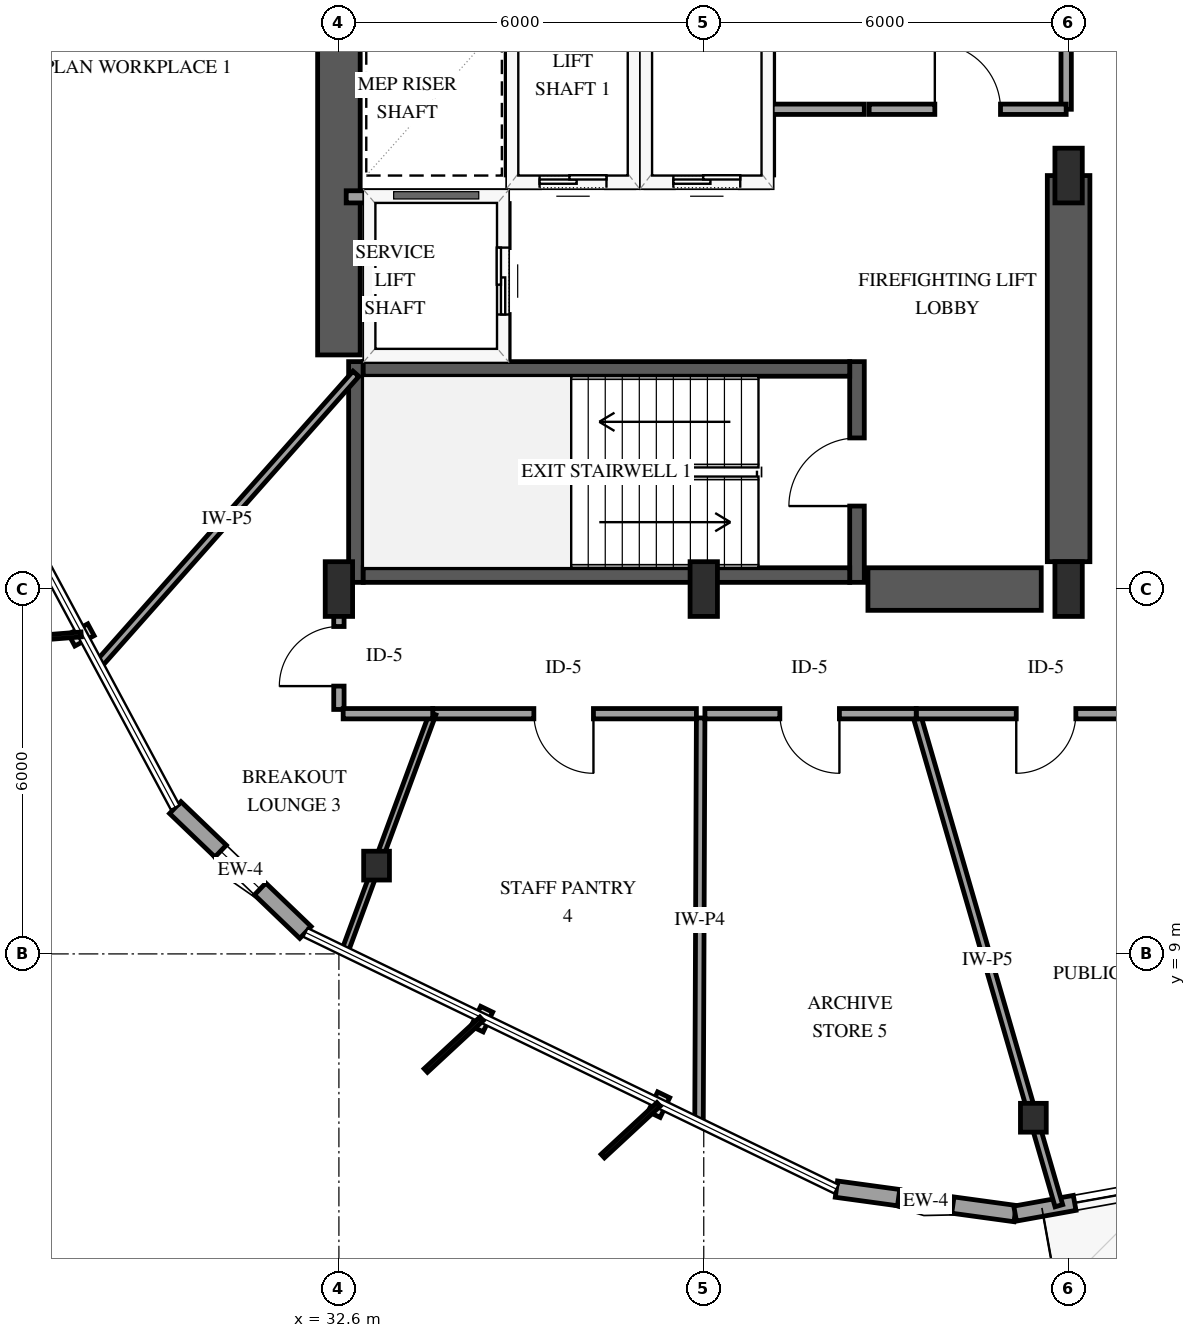
"""IFC4 building model, lengths in metres.
Left out: names, types, materials, properties, quantities, classifications, styles, units other than length and angle.
Written with IfcOpenShell. Run it as: python <this file> out.ifc"""

import sys

from ifc_helpers import new_model, si_unit, direction, frame, frame_2d, origin, origin_2d, place, context, subcontext, project, spatial, rectangle, i_section, extrude, element, fill, save


model = new_model("IFC4")
c1 = context("Model", 3, precision=1e-05, world=origin(), true_north=direction((0.0, 1.0)))
c2 = subcontext(c1, "Body", "Model", "MODEL_VIEW")
j1 = project(units=[si_unit("LENGTHUNIT", "METRE"), si_unit("PLANEANGLEUNIT", "RADIAN")], contexts=[c1])
p1 = place(None, origin())
s1 = spatial("IfcSite", under=j1, at=p1, CompositionType="ELEMENT")
p2 = place(p1, origin())
s2 = spatial("IfcBuilding", under=s1, at=p2, CompositionType="ELEMENT")
p3 = place(p2, frame((0.0, 0.0, 66.6)))
s3 = spatial("IfcBuildingStorey", under=s2, at=p3, CompositionType="ELEMENT", Elevation=66.6)
p4 = place(p3, frame((32.88, 15.11, 0.0), z_axis=(0.0, 0.0, 1.0), x_axis=(0.0, 1.0, 0.0)))
e1 = element("IfcWall", 1, at=p4, inside=s3, PredefinedType="SHEAR", context=c2, shape_type="SweptSolid", body=[
    extrude(rectangle(XDim=3.63, YDim=0.24, at=frame_2d((1.815, 0.0))), origin(), (0.0, 0.0, 1.0), 4.0),
])
p5 = place(p3, frame((41.12, 15.11, 0.0), z_axis=(0.0, 0.0, 1.0), x_axis=(0.0, 1.0, 0.0)))
e2 = element("IfcWall", 2, at=p5, inside=s3, PredefinedType="SHEAR", context=c2, shape_type="SweptSolid", body=[
    extrude(rectangle(XDim=3.63, YDim=0.24, at=frame_2d((1.815, 0.0))), origin(), (0.0, 0.0, 1.0), 4.0),
])
p6 = place(p5, frame((1.255, 0.0, 0.0)))
e3 = element("IfcOpeningElement", 3, at=p6, cuts=e2, PredefinedType="OPENING", context=c2, shape_type="SweptSolid", body=[
    extrude(rectangle(XDim=1.12, YDim=2.15, at=frame_2d((0.56, 1.075))), frame((0.0, 0.13, 0.0), z_axis=(0.0, -1.0, 0.0), x_axis=(1.0, 0.0, 0.0)), (0.0, 0.0, 1.0), 0.26),
])
for number, where, z_axis, x_axis in (
    (4, (33.0, 15.23, 0.0), (0.0, 0.0, 1.0), (1.0, 0.0, 0.0)),
    (5, (33.0, 18.62, 0.0), (0.0, 0.0, 1.0), (1.0, 0.0, 0.0)),
):
    element("IfcWall", number, at=place(p3, frame(where, z_axis=z_axis, x_axis=x_axis)), inside=s3, PredefinedType="SHEAR", context=c2, shape_type="SweptSolid", body=[
        extrude(rectangle(XDim=8.0, YDim=0.24, at=frame_2d((4.0, 0.0))), origin(), (0.0, 0.0, 1.0), 4.0),
    ])
p7 = place(p3, frame((32.6, 18.85, 0.0), z_axis=(0.0, 0.0, 1.0), x_axis=(0.0, 1.0, 0.0)))
e6 = element("IfcWall", 6, at=p7, inside=s3, PredefinedType="SHEAR", context=c2, shape_type="SweptSolid", body=[
    extrude(rectangle(XDim=12.3, YDim=0.7, at=frame_2d((6.15, 0.0))), origin(), (0.0, 0.0, 1.0), 4.0),
])
p8 = place(p3, frame((41.3, 15.0, 0.0), z_axis=(0.0, 0.0, 1.0), x_axis=(1.0, 0.0, 0.0)))
e7 = element("IfcWall", 7, at=p8, inside=s3, PredefinedType="SHEAR", context=c2, shape_type="SweptSolid", body=[
    extrude(rectangle(XDim=2.85, YDim=0.7, at=frame_2d((1.425, 0.0))), origin(), (0.0, 0.0, 1.0), 4.0),
])
p9 = place(p3, frame((44.6, 15.45, 0.0), z_axis=(0.0, 0.0, 1.0), x_axis=(0.0, 1.0, 0.0)))
e8 = element("IfcWall", 8, at=p9, inside=s3, PredefinedType="SHEAR", context=c2, shape_type="SweptSolid", body=[
    extrude(rectangle(XDim=6.35, YDim=0.7, at=frame_2d((3.175, 0.0))), origin(), (0.0, 0.0, 1.0), 4.0),
])
for number, where, z_axis, x_axis in (
    (9, (32.6, 15.0, 0.0), (0.0, 0.0, 1.0), (1.0, 0.0, 0.0)),
    (10, (38.6, 15.0, 0.0), (0.0, 0.0, 1.0), (1.0, 0.0, 0.0)),
    (11, (44.6, 15.0, 0.0), (0.0, 0.0, 1.0), (1.0, 0.0, 0.0)),
    (12, (44.6, 21.8, 0.0), (0.0, 0.0, 1.0), (1.0, 0.0, 0.0)),
):
    element("IfcColumn", number, at=place(p3, frame(where, z_axis=z_axis, x_axis=x_axis)), inside=s3, PredefinedType="PILASTER", context=c2, shape_type="SweptSolid", body=[
        extrude(rectangle(XDim=0.45, YDim=0.9, at=origin_2d()), origin(), (0.0, 0.0, 1.0), 4.0),
    ])
for number, where, z_axis, x_axis in (
    (13, (33.219, 10.452, 0.0), (0.0, 0.0, 1.0), (1.0, 0.0, 0.0)),
    (14, (44.02, 6.306, 0.0), (0.0, 0.0, 1.0), (1.0, 0.0, 0.0)),
):
    element("IfcColumn", number, at=place(p3, frame(where, z_axis=z_axis, x_axis=x_axis)), inside=s3, PredefinedType="COLUMN", context=c2, shape_type="SweptSolid", body=[
        extrude(i_section(OverallWidth=0.424, OverallDepth=0.474, WebThickness=0.048, FlangeThickness=0.077, FilletRadius=0.038, at=origin_2d()), origin(), (0.0, 0.0, 1.0), 4.0),
    ])
p10 = place(p3, frame((29.909, 11.406, 0.0), z_axis=(0.0, 0.0, 1.0), x_axis=(0.721765475307, -0.69213770209, 0.0)))
e15 = element("IfcWall", 15, at=p10, inside=s3, PredefinedType="SOLIDWALL", context=c2, shape_type="SweptSolid", body=[
    extrude(rectangle(XDim=2.967, YDim=0.27, at=frame_2d((1.483, 0.0))), origin(), (0.0, 0.0, 1.0), 3.079),
])
p11 = place(p10, frame((1.033, 0.0, 0.75)))
e16 = element("IfcOpeningElement", 16, at=p11, cuts=e15, PredefinedType="OPENING", context=c2, shape_type="SweptSolid", body=[
    extrude(rectangle(XDim=0.9, YDim=1.5, at=frame_2d((0.45, 0.75))), frame((0.0, 0.145, 0.0), z_axis=(0.0, -1.0, 0.0), x_axis=(1.0, 0.0, 0.0)), (0.0, 0.0, 1.0), 0.29),
])
p12 = place(p3, frame((40.781, 5.132, 0.0), z_axis=(0.0, 0.0, 1.0), x_axis=(0.990749365916, -0.13570443595, 0.0)))
e17 = element("IfcWall", 17, at=p12, inside=s3, PredefinedType="SOLIDWALL", context=c2, shape_type="SweptSolid", body=[
    extrude(rectangle(XDim=2.967, YDim=0.27, at=frame_2d((1.483, 0.0))), origin(), (0.0, 0.0, 1.0), 3.079),
])
p13 = place(p12, frame((1.033, 0.0, 0.75)))
e18 = element("IfcOpeningElement", 18, at=p13, cuts=e17, PredefinedType="OPENING", context=c2, shape_type="SweptSolid", body=[
    extrude(rectangle(XDim=0.9, YDim=1.5, at=frame_2d((0.45, 0.75))), frame((0.0, 0.145, 0.0), z_axis=(0.0, -1.0, 0.0), x_axis=(1.0, 0.0, 0.0)), (0.0, 0.0, 1.0), 0.29),
])
p14 = place(p3, frame((43.72, 4.729, 0.0), z_axis=(0.0, 0.0, 1.0), x_axis=(0.984196927588, 0.177077406028, 0.0)))
e19 = element("IfcWall", 19, at=p14, inside=s3, PredefinedType="SOLIDWALL", context=c2, shape_type="SweptSolid", body=[
    extrude(rectangle(XDim=9.698, YDim=0.25, at=frame_2d((4.849, 0.0))), origin(), (0.0, 0.0, 1.0), 3.079),
])
p15 = place(p14, frame((4.349, 0.0, 0.0)))
e20 = element("IfcOpeningElement", 20, at=p15, cuts=e19, PredefinedType="OPENING", context=c2, shape_type="SweptSolid", body=[
    extrude(rectangle(XDim=1.05, YDim=2.15, at=frame_2d((0.525, 1.075))), frame((0.0, 0.135, 0.0), z_axis=(0.0, -1.0, 0.0), x_axis=(1.0, 0.0, 0.0)), (0.0, 0.0, 1.0), 0.27),
])
p16 = place(p14, frame((0.995, 0.0, 0.72)))
e21 = element("IfcOpeningElement", 21, at=p16, cuts=e19, PredefinedType="OPENING", context=c2, shape_type="SweptSolid", body=[
    extrude(rectangle(XDim=1.05, YDim=1.55, at=frame_2d((0.525, 0.775))), frame((0.0, 0.135, 0.0), z_axis=(0.0, -1.0, 0.0), x_axis=(1.0, 0.0, 0.0)), (0.0, 0.0, 1.0), 0.27),
])
p17 = place(p14, frame((7.666, 0.0, 0.72)))
e22 = element("IfcOpeningElement", 22, at=p17, cuts=e19, PredefinedType="OPENING", context=c2, shape_type="SweptSolid", body=[
    extrude(rectangle(XDim=1.05, YDim=1.55, at=frame_2d((0.525, 0.775))), frame((0.0, 0.135, 0.0), z_axis=(0.0, -1.0, 0.0), x_axis=(1.0, 0.0, 0.0)), (0.0, 0.0, 1.0), 0.27),
])
p18 = place(p3, frame((35.45, 21.7, 0.0), z_axis=(0.0, 0.0, 1.0), x_axis=(1.0, 0.0, 0.0)))
e23 = element("IfcWall", 23, at=p18, inside=s3, PredefinedType="SOLIDWALL", context=c2, shape_type="SweptSolid", body=[
    extrude(rectangle(XDim=2.0, YDim=0.2, at=frame_2d((1.0, 0.0))), origin(), (0.0, 0.0, 1.0), 3.7),
])
p19 = place(p18, frame((0.45, 0.0, 0.0)))
e24 = element("IfcOpeningElement", 24, at=p19, cuts=e23, PredefinedType="OPENING", context=c2, shape_type="SweptSolid", body=[
    extrude(rectangle(XDim=1.1, YDim=2.15, at=frame_2d((0.55, 1.075))), frame((0.0, 0.11, 0.0), z_axis=(0.0, -1.0, 0.0), x_axis=(1.0, 0.0, 0.0)), (0.0, 0.0, 1.0), 0.22),
])
for number, where, z_axis, x_axis in (
    (25, (35.45, 21.81, 0.0), (0.0, 0.0, 1.0), (0.0, 1.0, 0.0)),
    (26, (37.45, 21.81, 0.0), (0.0, 0.0, 1.0), (0.0, 1.0, 0.0)),
):
    element("IfcWall", number, at=place(p3, frame(where, z_axis=z_axis, x_axis=x_axis)), inside=s3, PredefinedType="SOLIDWALL", context=c2, shape_type="SweptSolid", body=[
        extrude(rectangle(XDim=2.38, YDim=0.2, at=frame_2d((1.19, 0.0))), origin(), (0.0, 0.0, 1.0), 3.7),
    ])
p20 = place(p3, frame((37.65, 21.7, 0.0), z_axis=(0.0, 0.0, 1.0), x_axis=(1.0, 0.0, 0.0)))
e27 = element("IfcWall", 27, at=p20, inside=s3, PredefinedType="SOLIDWALL", context=c2, shape_type="SweptSolid", body=[
    extrude(rectangle(XDim=2.0, YDim=0.2, at=frame_2d((1.0, 0.0))), origin(), (0.0, 0.0, 1.0), 3.7),
])
p21 = place(p20, frame((0.45, 0.0, 0.0)))
e28 = element("IfcOpeningElement", 28, at=p21, cuts=e27, PredefinedType="OPENING", context=c2, shape_type="SweptSolid", body=[
    extrude(rectangle(XDim=1.1, YDim=2.15, at=frame_2d((0.55, 1.075))), frame((0.0, 0.11, 0.0), z_axis=(0.0, -1.0, 0.0), x_axis=(1.0, 0.0, 0.0)), (0.0, 0.0, 1.0), 0.22),
])
p22 = place(p3, frame((39.65, 21.81, 0.0), z_axis=(0.0, 0.0, 1.0), x_axis=(0.0, 1.0, 0.0)))
e29 = element("IfcWall", 29, at=p22, inside=s3, PredefinedType="SOLIDWALL", context=c2, shape_type="SweptSolid", body=[
    extrude(rectangle(XDim=2.38, YDim=0.2, at=frame_2d((1.19, 0.0))), origin(), (0.0, 0.0, 1.0), 3.7),
])
p23 = place(p3, frame((32.72, 21.45, 0.0), z_axis=(0.0, 0.0, 1.0), x_axis=(1.0, 0.0, 0.0)))
e30 = element("IfcWall", 30, at=p23, inside=s3, PredefinedType="SOLIDWALL", context=c2, shape_type="SweptSolid", body=[
    extrude(rectangle(XDim=2.58, YDim=0.2, at=frame_2d((1.29, 0.0))), origin(), (0.0, 0.0, 1.0), 3.7),
])
p24 = place(p3, frame((35.3, 18.79, 0.0), z_axis=(0.0, 0.0, 1.0), x_axis=(0.0, 1.0, 0.0)))
e31 = element("IfcWall", 31, at=p24, inside=s3, PredefinedType="SOLIDWALL", context=c2, shape_type="SweptSolid", body=[
    extrude(rectangle(XDim=2.55, YDim=0.2, at=frame_2d((1.275, 0.0))), origin(), (0.0, 0.0, 1.0), 3.7),
])
p25 = place(p24, frame((0.725, 0.0, 0.0)))
e32 = element("IfcOpeningElement", 32, at=p25, cuts=e31, PredefinedType="OPENING", context=c2, shape_type="SweptSolid", body=[
    extrude(rectangle(XDim=1.1, YDim=2.15, at=frame_2d((0.55, 1.075))), frame((0.0, 0.11, 0.0), z_axis=(0.0, -1.0, 0.0), x_axis=(1.0, 0.0, 0.0)), (0.0, 0.0, 1.0), 0.22),
])
p26 = place(p3, frame((42.094, 12.95, 0.0), z_axis=(0.0, 0.0, 1.0), x_axis=(0.278473925735, -0.960443789446, 0.0)))
e33 = element("IfcWall", 33, at=p26, inside=s3, PredefinedType="PARTITIONING", context=c2, shape_type="SweptSolid", body=[
    extrude(rectangle(XDim=8.424, YDim=0.13, at=frame_2d((4.212, 0.0))), origin(), (0.0, 0.0, 1.0), 2.995),
])
p27 = place(p3, frame((44.56, 29.8, 0.0), z_axis=(0.0, 0.0, 1.0), x_axis=(0.0, -1.0, 0.0)))
e34 = element("IfcWall", 34, at=p27, inside=s3, PredefinedType="PARTITIONING", context=c2, shape_type="SweptSolid", body=[
    extrude(rectangle(XDim=6.91, YDim=0.17, at=frame_2d((3.455, 0.0))), origin(), (0.0, 0.0, 1.0), 2.74),
])
p28 = place(p27, frame((2.915, 0.0, 0.0)))
e35 = element("IfcOpeningElement", 35, at=p28, cuts=e34, PredefinedType="OPENING", context=c2, shape_type="SweptSolid", body=[
    extrude(rectangle(XDim=1.08, YDim=2.15, at=frame_2d((0.54, 1.075))), frame((0.0, 0.095, 0.0), z_axis=(0.0, -1.0, 0.0), x_axis=(1.0, 0.0, 0.0)), (0.0, 0.0, 1.0), 0.19),
])
p29 = place(p3, frame((38.549, 12.88, 0.0), z_axis=(0.0, 0.0, 1.0), x_axis=(-0.004071567748, -0.999991711134, 0.0)))
e36 = element("IfcWall", 36, at=p29, inside=s3, PredefinedType="PARTITIONING", context=c2, shape_type="SweptSolid", body=[
    extrude(rectangle(XDim=6.656, YDim=0.14, at=frame_2d((3.328, 0.0))), origin(), (0.0, 0.0, 1.0), 3.7),
])
p30 = place(p3, frame((32.88, 18.54, 0.0), z_axis=(0.0, 0.0, 1.0), x_axis=(-0.66312401375, -0.748509547293, 0.0)))
e37 = element("IfcWall", 37, at=p30, inside=s3, PredefinedType="PARTITIONING", context=c2, shape_type="SweptSolid", body=[
    extrude(rectangle(XDim=6.385, YDim=0.13, at=frame_2d((3.192, 0.0))), origin(), (0.0, 0.0, 1.0), 3.7),
])
p31 = place(p3, frame((38.479, 12.95, 0.0), z_axis=(0.0, 0.0, 1.0), x_axis=(-1.0, 0.0, 0.0)))
e38 = element("IfcWall", 38, at=p31, inside=s3, PredefinedType="PARTITIONING", context=c2, shape_type="SweptSolid", body=[
    extrude(rectangle(XDim=4.336, YDim=0.17, at=frame_2d((2.168, 0.0))), origin(), (0.0, 0.0, 1.0), 3.7),
])
p32 = place(p31, frame((1.693, 0.0, 0.0)))
e39 = element("IfcOpeningElement", 39, at=p32, cuts=e38, PredefinedType="OPENING", context=c2, shape_type="SweptSolid", body=[
    extrude(rectangle(XDim=0.98, YDim=2.15, at=frame_2d((0.49, 1.075))), frame((0.0, 0.095, 0.0), z_axis=(0.0, -1.0, 0.0), x_axis=(1.0, 0.0, 0.0)), (0.0, 0.0, 1.0), 0.19),
])
p33 = place(p3, frame((46.395, 12.95, 0.0), z_axis=(0.0, 0.0, 1.0), x_axis=(-1.0, 0.0, 0.0)))
e40 = element("IfcWall", 40, at=p33, inside=s3, PredefinedType="PARTITIONING", context=c2, shape_type="SweptSolid", body=[
    extrude(rectangle(XDim=4.301, YDim=0.17, at=frame_2d((2.15, 0.0))), origin(), (0.0, 0.0, 1.0), 3.7),
])
p34 = place(p33, frame((1.676, 0.0, 0.0)))
e41 = element("IfcOpeningElement", 41, at=p34, cuts=e40, PredefinedType="OPENING", context=c2, shape_type="SweptSolid", body=[
    extrude(rectangle(XDim=0.98, YDim=2.15, at=frame_2d((0.49, 1.075))), frame((0.0, 0.095, 0.0), z_axis=(0.0, -1.0, 0.0), x_axis=(1.0, 0.0, 0.0)), (0.0, 0.0, 1.0), 0.19),
])
p35 = place(p3, frame((34.143, 12.95, 0.0), z_axis=(0.0, 0.0, 1.0), x_axis=(-0.346877521655, -0.937910435474, 0.0)))
e42 = element("IfcWall", 42, at=p35, inside=s3, PredefinedType="PARTITIONING", context=c2, shape_type="SweptSolid", body=[
    extrude(rectangle(XDim=4.169, YDim=0.11, at=frame_2d((2.084, 0.0))), origin(), (0.0, 0.0, 1.0), 2.995),
])
p36 = place(p3, frame((42.094, 12.95, 0.0), z_axis=(0.0, 0.0, 1.0), x_axis=(-1.0, 0.0, 0.0)))
e43 = element("IfcWall", 43, at=p36, inside=s3, PredefinedType="PARTITIONING", context=c2, shape_type="SweptSolid", body=[
    extrude(rectangle(XDim=3.475, YDim=0.17, at=frame_2d((1.738, 0.0))), origin(), (0.0, 0.0, 1.0), 3.7),
])
p37 = place(p36, frame((1.263, 0.0, 0.0)))
e44 = element("IfcOpeningElement", 44, at=p37, cuts=e43, PredefinedType="OPENING", context=c2, shape_type="SweptSolid", body=[
    extrude(rectangle(XDim=0.98, YDim=2.15, at=frame_2d((0.49, 1.075))), frame((0.0, 0.095, 0.0), z_axis=(0.0, -1.0, 0.0), x_axis=(1.0, 0.0, 0.0)), (0.0, 0.0, 1.0), 0.19),
])
p38 = place(p3, frame((41.32, 22.89, 0.0), z_axis=(0.0, 0.0, 1.0), x_axis=(1.0, 0.0, 0.0)))
e45 = element("IfcWall", 45, at=p38, inside=s3, PredefinedType="PARTITIONING", context=c2, shape_type="SweptSolid", body=[
    extrude(rectangle(XDim=3.24, YDim=0.17, at=frame_2d((1.62, 0.0))), origin(), (0.0, 0.0, 1.0), 3.7),
])
p39 = place(p38, frame((1.08, 0.0, 0.0)))
e46 = element("IfcOpeningElement", 46, at=p39, cuts=e45, PredefinedType="OPENING", context=c2, shape_type="SweptSolid", body=[
    extrude(rectangle(XDim=1.08, YDim=2.15, at=frame_2d((0.54, 1.075))), frame((0.0, 0.095, 0.0), z_axis=(0.0, -1.0, 0.0), x_axis=(1.0, 0.0, 0.0)), (0.0, 0.0, 1.0), 0.19),
])
p40 = place(p3, frame((32.6, 13.02, 0.0), z_axis=(0.0, 0.0, 1.0), x_axis=(0.0, 1.0, 0.0)))
e47 = element("IfcWall", 47, at=p40, inside=s3, PredefinedType="PARTITIONING", context=c2, shape_type="SweptSolid", body=[
    extrude(rectangle(XDim=1.91, YDim=0.17, at=frame_2d((0.955, 0.0))), origin(), (0.0, 0.0, 1.0), 3.7),
])
p41 = place(p40, frame((0.384, 0.0, 0.0)))
e48 = element("IfcOpeningElement", 48, at=p41, cuts=e47, PredefinedType="OPENING", context=c2, shape_type="SweptSolid", body=[
    extrude(rectangle(XDim=0.98, YDim=2.15, at=frame_2d((0.49, 1.075))), frame((0.0, 0.095, 0.0), z_axis=(0.0, -1.0, 0.0), x_axis=(1.0, 0.0, 0.0)), (0.0, 0.0, 1.0), 0.19),
])
p42 = place(p3, frame((39.72, 22.89, 0.0), z_axis=(0.0, 0.0, 1.0), x_axis=(1.0, 0.0, 0.0)))
e49 = element("IfcWall", 49, at=p42, inside=s3, PredefinedType="PARTITIONING", context=c2, shape_type="SweptSolid", body=[
    extrude(rectangle(XDim=1.52, YDim=0.17, at=frame_2d((0.76, 0.0))), origin(), (0.0, 0.0, 1.0), 3.7),
])
p43 = place(p3, frame((34.143, 12.95, 0.0), z_axis=(0.0, 0.0, 1.0), x_axis=(-1.0, 0.0, 0.0)))
e50 = element("IfcWall", 50, at=p43, inside=s3, PredefinedType="PARTITIONING", context=c2, shape_type="SweptSolid", body=[
    extrude(rectangle(XDim=1.473, YDim=0.17, at=frame_2d((0.737, 0.0))), origin(), (0.0, 0.0, 1.0), 3.7),
])
p44 = place(p11, origin())
e51 = element("IfcWindow", 51, at=p44, inside=s3, PartitioningType="SINGLE_PANEL", PredefinedType="WINDOW", context=c2, shape_type="SweptSolid", body=[
    extrude(rectangle(XDim=0.9, YDim=1.5, at=frame_2d((0.45, 0.75))), frame((0.0, 0.03, 0.0), z_axis=(0.0, -1.0, 0.0), x_axis=(1.0, 0.0, 0.0)), (0.0, 0.0, 1.0), 0.06),
])
fill(e16, e51)
p45 = place(p13, origin())
e52 = element("IfcWindow", 52, at=p45, inside=s3, PartitioningType="SINGLE_PANEL", PredefinedType="WINDOW", context=c2, shape_type="SweptSolid", body=[
    extrude(rectangle(XDim=0.9, YDim=1.5, at=frame_2d((0.45, 0.75))), frame((0.0, 0.03, 0.0), z_axis=(0.0, -1.0, 0.0), x_axis=(1.0, 0.0, 0.0)), (0.0, 0.0, 1.0), 0.06),
])
fill(e18, e52)
p46 = place(p16, origin())
e53 = element("IfcWindow", 53, at=p46, inside=s3, PartitioningType="SINGLE_PANEL", PredefinedType="WINDOW", context=c2, shape_type="SweptSolid", body=[
    extrude(rectangle(XDim=1.05, YDim=1.55, at=frame_2d((0.525, 0.775))), frame((0.0, 0.03, 0.0), z_axis=(0.0, -1.0, 0.0), x_axis=(1.0, 0.0, 0.0)), (0.0, 0.0, 1.0), 0.06),
])
fill(e21, e53)
p47 = place(p19, origin())
e54 = element("IfcDoor", 54, at=p47, inside=s3, OperationType="SLIDING_TO_LEFT", PredefinedType="DOOR", context=c2, shape_type="SweptSolid", body=[
    extrude(rectangle(XDim=1.1, YDim=2.15, at=frame_2d((0.55, 1.075))), frame((0.0, 0.025, 0.0), z_axis=(0.0, -1.0, 0.0), x_axis=(1.0, 0.0, 0.0)), (0.0, 0.0, 1.0), 0.05),
])
fill(e24, e54)
p48 = place(p21, origin())
e55 = element("IfcDoor", 55, at=p48, inside=s3, OperationType="SLIDING_TO_LEFT", PredefinedType="DOOR", context=c2, shape_type="SweptSolid", body=[
    extrude(rectangle(XDim=1.1, YDim=2.15, at=frame_2d((0.55, 1.075))), frame((0.0, 0.025, 0.0), z_axis=(0.0, -1.0, 0.0), x_axis=(1.0, 0.0, 0.0)), (0.0, 0.0, 1.0), 0.05),
])
fill(e28, e55)
p49 = place(p25, origin())
e56 = element("IfcDoor", 56, at=p49, inside=s3, OperationType="SLIDING_TO_LEFT", PredefinedType="DOOR", context=c2, shape_type="SweptSolid", body=[
    extrude(rectangle(XDim=1.1, YDim=2.15, at=frame_2d((0.55, 1.075))), frame((0.0, 0.025, 0.0), z_axis=(0.0, -1.0, 0.0), x_axis=(1.0, 0.0, 0.0)), (0.0, 0.0, 1.0), 0.05),
])
fill(e32, e56)
p50 = place(p6, origin())
e57 = element("IfcDoor", 57, at=p50, inside=s3, OperationType="SINGLE_SWING_LEFT", PredefinedType="DOOR", context=c2, shape_type="SweptSolid", body=[
    extrude(rectangle(XDim=1.12, YDim=2.15, at=frame_2d((0.56, 1.075))), frame((0.0, 0.025, 0.0), z_axis=(0.0, -1.0, 0.0), x_axis=(1.0, 0.0, 0.0)), (0.0, 0.0, 1.0), 0.05),
])
fill(e3, e57)
p51 = place(p32, origin())
e58 = element("IfcDoor", 58, at=p51, inside=s3, OperationType="SINGLE_SWING_LEFT", PredefinedType="DOOR", context=c2, shape_type="SweptSolid", body=[
    extrude(rectangle(XDim=0.98, YDim=2.15, at=frame_2d((0.49, 1.075))), frame((0.0, 0.025, 0.0), z_axis=(0.0, -1.0, 0.0), x_axis=(1.0, 0.0, 0.0)), (0.0, 0.0, 1.0), 0.05),
])
fill(e39, e58)
p52 = place(p34, origin())
e59 = element("IfcDoor", 59, at=p52, inside=s3, OperationType="SINGLE_SWING_RIGHT", PredefinedType="DOOR", context=c2, shape_type="SweptSolid", body=[
    extrude(rectangle(XDim=0.98, YDim=2.15, at=frame_2d((0.49, 1.075))), frame((0.0, 0.025, 0.0), z_axis=(0.0, -1.0, 0.0), x_axis=(1.0, 0.0, 0.0)), (0.0, 0.0, 1.0), 0.05),
])
fill(e41, e59)
p53 = place(p37, origin())
e60 = element("IfcDoor", 60, at=p53, inside=s3, OperationType="SINGLE_SWING_LEFT", PredefinedType="DOOR", context=c2, shape_type="SweptSolid", body=[
    extrude(rectangle(XDim=0.98, YDim=2.15, at=frame_2d((0.49, 1.075))), frame((0.0, 0.025, 0.0), z_axis=(0.0, -1.0, 0.0), x_axis=(1.0, 0.0, 0.0)), (0.0, 0.0, 1.0), 0.05),
])
fill(e44, e60)
p54 = place(p39, origin())
e61 = element("IfcDoor", 61, at=p54, inside=s3, OperationType="SINGLE_SWING_LEFT", PredefinedType="DOOR", context=c2, shape_type="SweptSolid", body=[
    extrude(rectangle(XDim=1.08, YDim=2.15, at=frame_2d((0.54, 1.075))), frame((0.0, 0.025, 0.0), z_axis=(0.0, -1.0, 0.0), x_axis=(1.0, 0.0, 0.0)), (0.0, 0.0, 1.0), 0.05),
])
fill(e46, e61)
p55 = place(p41, origin())
e62 = element("IfcDoor", 62, at=p55, inside=s3, OperationType="SINGLE_SWING_LEFT", PredefinedType="DOOR", context=c2, shape_type="SweptSolid", body=[
    extrude(rectangle(XDim=0.98, YDim=2.15, at=frame_2d((0.49, 1.075))), frame((0.0, 0.025, 0.0), z_axis=(0.0, -1.0, 0.0), x_axis=(1.0, 0.0, 0.0)), (0.0, 0.0, 1.0), 0.05),
])
fill(e48, e62)
save(model, sys.argv[1])
